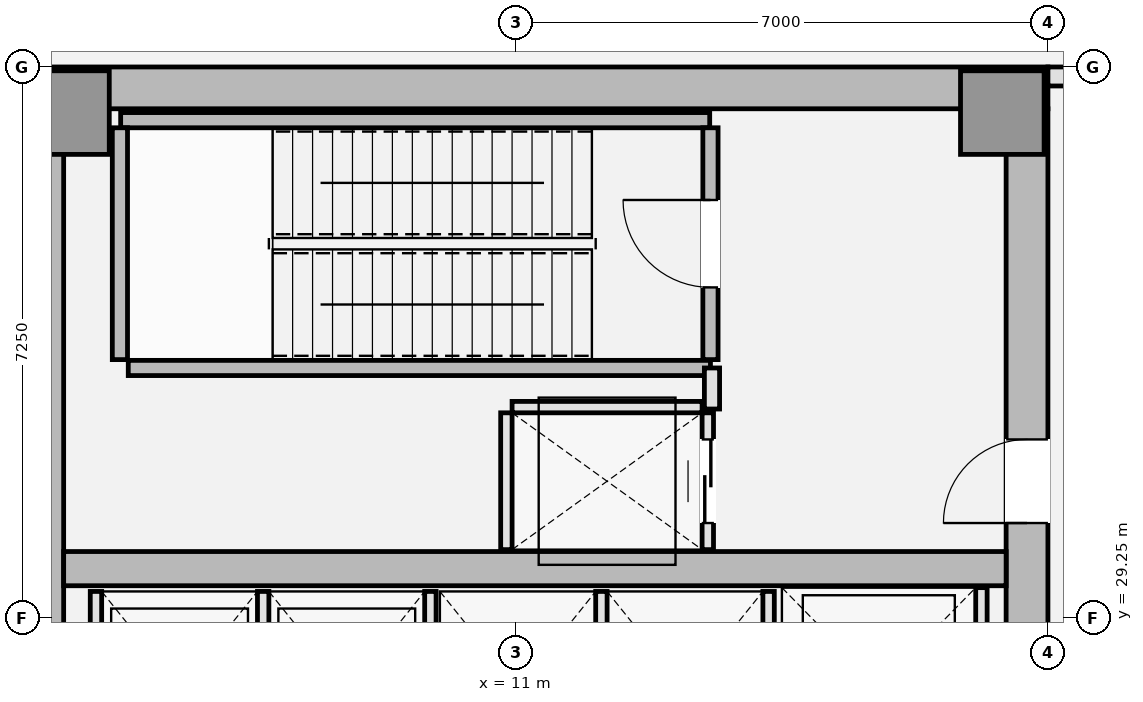
"""IFC4 building model, lengths in metres.
Left out: names, types, materials, properties, quantities, classifications, styles, units other than length and angle.
Written with IfcOpenShell. Run it as: python <this file> out.ifc"""

import sys

from ifc_helpers import new_model, si_unit, direction, frame, frame_2d, origin, origin_2d, place, context, subcontext, project, spatial, rectangle, extrude, element, fill, save


model = new_model("IFC4")
c1 = context("Model", 3, precision=1e-05, world=origin(), true_north=direction((0.0, 1.0)))
c2 = subcontext(c1, "Body", "Model", "MODEL_VIEW")
j1 = project(units=[si_unit("LENGTHUNIT", "METRE"), si_unit("PLANEANGLEUNIT", "RADIAN")], contexts=[c1])
p1 = place(None, origin())
s1 = spatial("IfcSite", under=j1, at=p1, CompositionType="ELEMENT")
p2 = place(p1, origin())
s2 = spatial("IfcBuilding", under=s1, at=p2, CompositionType="ELEMENT")
p3 = place(p2, frame((0.0, 0.0, 178.05)))
s3 = spatial("IfcBuildingStorey", under=s2, at=p3, CompositionType="ELEMENT", Elevation=178.05)
p4 = place(p3, frame((4.5, 36.225, 0.0), z_axis=(0.0, 0.0, 1.0), x_axis=(1.0, 0.0, 0.0)))
e1 = element("IfcWall", 1, at=p4, inside=s3, PredefinedType="SHEAR", context=c2, shape_type="SweptSolid", body=[
    extrude(rectangle(XDim=13.5, YDim=0.55, at=frame_2d((6.75, 0.0))), origin(), (0.0, 0.0, 1.0), 5.6),
])
p5 = place(p3, frame((4.775, 14.55, 0.0), z_axis=(0.0, 0.0, 1.0), x_axis=(0.0, 1.0, 0.0)))
e2 = element("IfcWall", 2, at=p5, inside=s3, PredefinedType="SHEAR", context=c2, shape_type="SweptSolid", body=[
    extrude(rectangle(XDim=21.4, YDim=0.55, at=frame_2d((10.7, 0.0))), origin(), (0.0, 0.0, 1.0), 5.6),
])
p6 = place(p3, frame((17.725, 27.05, 0.0), z_axis=(0.0, 0.0, 1.0), x_axis=(0.0, 1.0, 0.0)))
e3 = element("IfcWall", 3, at=p6, inside=s3, PredefinedType="SHEAR", context=c2, shape_type="SweptSolid", body=[
    extrude(rectangle(XDim=8.9, YDim=0.55, at=frame_2d((4.45, 0.0))), origin(), (0.0, 0.0, 1.0), 5.6),
])
p7 = place(p6, frame((3.45, 0.0, 0.0)))
e4 = element("IfcOpeningElement", 4, at=p7, cuts=e3, PredefinedType="OPENING", context=c2, shape_type="SweptSolid", body=[
    extrude(rectangle(XDim=1.1, YDim=2.15, at=frame_2d((0.55, 1.075))), frame((0.0, 0.285, 0.0), z_axis=(0.0, -1.0, 0.0), x_axis=(1.0, 0.0, 0.0)), (0.0, 0.0, 1.0), 0.57),
])
p8 = place(p3, frame((5.05, 29.9, 0.0), z_axis=(0.0, 0.0, 1.0), x_axis=(1.0, 0.0, 0.0)))
e5 = element("IfcWall", 5, at=p8, inside=s3, PredefinedType="SHEAR", context=c2, shape_type="SweptSolid", body=[
    extrude(rectangle(XDim=12.4, YDim=0.45, at=frame_2d((6.2, 0.0))), origin(), (0.0, 0.0, 1.0), 5.6),
])
for number, where, z_axis, x_axis in (
    (6, (5.1, 35.9, 0.0), (0.0, 0.0, 1.0), (1.0, 0.0, 0.0)),
    (7, (17.4, 35.9, 0.0), (0.0, 0.0, 1.0), (1.0, 0.0, 0.0)),
):
    element("IfcColumn", number, at=place(p3, frame(where, z_axis=z_axis, x_axis=x_axis)), inside=s3, PredefinedType="PILASTER", context=c2, shape_type="SweptSolid", body=[
        extrude(rectangle(XDim=1.1, YDim=1.1, at=origin_2d()), origin(), (0.0, 0.0, 1.0), 5.6),
    ])
p9 = place(p3, frame((24.2, 36.375, 0.0), z_axis=(0.0, 0.0, 1.0), x_axis=(-1.0, 0.0, 0.0)))
e8 = element("IfcWall", 8, at=p9, inside=s3, PredefinedType="SOLIDWALL", context=c2, shape_type="SweptSolid", body=[
    extrude(rectangle(XDim=6.2, YDim=0.25, at=frame_2d((3.1, 0.0))), origin(), (0.0, 0.0, 1.0), 5.42),
])
p10 = place(p3, frame((5.8, 35.8, 0.0), z_axis=(0.0, 0.0, 1.0), x_axis=(1.0, 0.0, 0.0)))
e9 = element("IfcWall", 9, at=p10, inside=s3, PredefinedType="SOLIDWALL", context=c2, shape_type="SweptSolid", body=[
    extrude(rectangle(XDim=7.75, YDim=0.2, at=frame_2d((3.875, 0.0))), origin(), (0.0, 0.0, 1.0), 5.6),
])
p11 = place(p3, frame((5.79, 32.65, 0.0), z_axis=(0.0, 0.0, 1.0), x_axis=(0.0, 1.0, 0.0)))
e10 = element("IfcWall", 10, at=p11, inside=s3, PredefinedType="SOLIDWALL", context=c2, shape_type="SweptSolid", body=[
    extrude(rectangle(XDim=3.05, YDim=0.2, at=frame_2d((1.525, 0.0))), origin(), (0.0, 0.0, 1.0), 5.6),
])
p12 = place(p3, frame((5.9, 32.54, 0.0), z_axis=(0.0, 0.0, 1.0), x_axis=(1.0, 0.0, 0.0)))
e11 = element("IfcWall", 11, at=p12, inside=s3, PredefinedType="SOLIDWALL", context=c2, shape_type="SweptSolid", body=[
    extrude(rectangle(XDim=7.66, YDim=0.2, at=frame_2d((3.83, 0.0))), origin(), (0.0, 0.0, 1.0), 5.6),
])
p13 = place(p3, frame((13.56, 32.65, 0.0), z_axis=(0.0, 0.0, 1.0), x_axis=(0.0, 1.0, 0.0)))
e12 = element("IfcWall", 12, at=p13, inside=s3, PredefinedType="SOLIDWALL", context=c2, shape_type="SweptSolid", body=[
    extrude(rectangle(XDim=3.05, YDim=0.2, at=frame_2d((1.525, 0.0))), origin(), (0.0, 0.0, 1.0), 5.6),
])
p14 = place(p13, frame((0.95, 0.0, 0.0)))
e13 = element("IfcOpeningElement", 13, at=p14, cuts=e12, PredefinedType="OPENING", context=c2, shape_type="SweptSolid", body=[
    extrude(rectangle(XDim=1.15, YDim=2.15, at=frame_2d((0.575, 1.075))), frame((0.0, 0.11, 0.0), z_axis=(0.0, -1.0, 0.0), x_axis=(1.0, 0.0, 0.0)), (0.0, 0.0, 1.0), 0.22),
])
for number, where, z_axis, x_axis in (
    (14, (5.475, 27.05, 0.0), (0.0, 0.0, 1.0), (0.0, 1.0, 0.0)),
    (15, (7.675, 27.05, 0.0), (0.0, 0.0, 1.0), (0.0, 1.0, 0.0)),
    (16, (9.875, 27.05, 0.0), (0.0, 0.0, 1.0), (0.0, 1.0, 0.0)),
    (17, (12.125, 27.05, 0.0), (0.0, 0.0, 1.0), (0.0, 1.0, 0.0)),
    (18, (14.325, 27.05, 0.0), (0.0, 0.0, 1.0), (0.0, 1.0, 0.0)),
):
    element("IfcWall", number, at=place(p3, frame(where, z_axis=z_axis, x_axis=x_axis)), inside=s3, PredefinedType="PARTITIONING", context=c2, shape_type="SweptSolid", body=[
        extrude(rectangle(XDim=2.55, YDim=0.15, at=frame_2d((1.275, 0.0))), origin(), (0.0, 0.0, 1.0), 5.42),
    ])
p15 = place(p3, frame((17.125, 27.05, 0.0), z_axis=(0.0, 0.0, 1.0), x_axis=(0.0, 1.0, 0.0)))
e19 = element("IfcWall", 19, at=p15, inside=s3, PredefinedType="PARTITIONING", context=c2, shape_type="SweptSolid", body=[
    extrude(rectangle(XDim=2.6, YDim=0.15, at=frame_2d((1.3, 0.0))), origin(), (0.0, 0.0, 1.0), 5.42),
])
p16 = place(p3, frame((10.95, 32.025, 0.0), z_axis=(0.0, 0.0, 1.0), x_axis=(1.0, 0.0, 0.0)))
e20 = element("IfcWall", 20, at=p16, inside=s3, PredefinedType="PARTITIONING", context=c2, shape_type="SweptSolid", body=[
    extrude(rectangle(XDim=2.5, YDim=0.15, at=frame_2d((1.25, 0.0))), origin(), (0.0, 0.0, 1.0), 5.42),
])
p17 = place(p3, frame((10.875, 30.15, 0.0), z_axis=(0.0, 0.0, 1.0), x_axis=(0.0, 1.0, 0.0)))
e21 = element("IfcWall", 21, at=p17, inside=s3, PredefinedType="PARTITIONING", context=c2, shape_type="SweptSolid", body=[
    extrude(rectangle(XDim=1.8, YDim=0.15, at=frame_2d((0.9, 0.0))), origin(), (0.0, 0.0, 1.0), 5.42),
])
p18 = place(p3, frame((13.525, 30.15, 0.0), z_axis=(0.0, 0.0, 1.0), x_axis=(0.0, 1.0, 0.0)))
e22 = element("IfcWall", 22, at=p18, inside=s3, PredefinedType="PARTITIONING", context=c2, shape_type="SweptSolid", body=[
    extrude(rectangle(XDim=1.8, YDim=0.15, at=frame_2d((0.9, 0.0))), origin(), (0.0, 0.0, 1.0), 5.42),
])
p19 = place(p18, frame((0.35, 0.0, 0.0)))
e23 = element("IfcOpeningElement", 23, at=p19, cuts=e22, PredefinedType="OPENING", context=c2, shape_type="SweptSolid", body=[
    extrude(rectangle(XDim=1.1, YDim=2.2, at=frame_2d((0.55, 1.1))), frame((0.0, 0.085, 0.0), z_axis=(0.0, -1.0, 0.0), x_axis=(1.0, 0.0, 0.0)), (0.0, 0.0, 1.0), 0.17),
])
p20 = place(p3, frame((13.58, 32.0, 0.0), z_axis=(0.0, 0.0, 1.0), x_axis=(0.0, 1.0, 0.0)))
e24 = element("IfcWall", 24, at=p20, inside=s3, PredefinedType="PARTITIONING", context=c2, shape_type="SweptSolid", body=[
    extrude(rectangle(XDim=0.54, YDim=0.2, at=frame_2d((0.27, 0.0))), origin(), (0.0, 0.0, 1.0), 5.42),
])
p21 = place(p14, origin())
e25 = element("IfcDoor", 25, at=p21, inside=s3, OperationType="SINGLE_SWING_RIGHT", PredefinedType="DOOR", context=c2, shape_type="SweptSolid", body=[
    extrude(rectangle(XDim=1.15, YDim=2.15, at=frame_2d((0.575, 1.075))), frame((0.0, 0.025, 0.0), z_axis=(0.0, -1.0, 0.0), x_axis=(1.0, 0.0, 0.0)), (0.0, 0.0, 1.0), 0.05),
])
fill(e13, e25)
p22 = place(p19, origin())
e26 = element("IfcDoor", 26, at=p22, inside=s3, OperationType="DOUBLE_DOOR_SLIDING", PredefinedType="DOOR", context=c2, shape_type="SweptSolid", body=[
    extrude(rectangle(XDim=1.1, YDim=2.2, at=frame_2d((0.55, 1.1))), frame((0.0, 0.025, 0.0), z_axis=(0.0, -1.0, 0.0), x_axis=(1.0, 0.0, 0.0)), (0.0, 0.0, 1.0), 0.05),
])
fill(e23, e26)
p23 = place(p7, origin())
e27 = element("IfcDoor", 27, at=p23, inside=s3, OperationType="SINGLE_SWING_LEFT", PredefinedType="DOOR", context=c2, shape_type="SweptSolid", body=[
    extrude(rectangle(XDim=1.1, YDim=2.15, at=frame_2d((0.55, 1.075))), frame((0.0, 0.025, 0.0), z_axis=(0.0, -1.0, 0.0), x_axis=(1.0, 0.0, 0.0)), (0.0, 0.0, 1.0), 0.05),
])
fill(e4, e27)
save(model, sys.argv[1])
